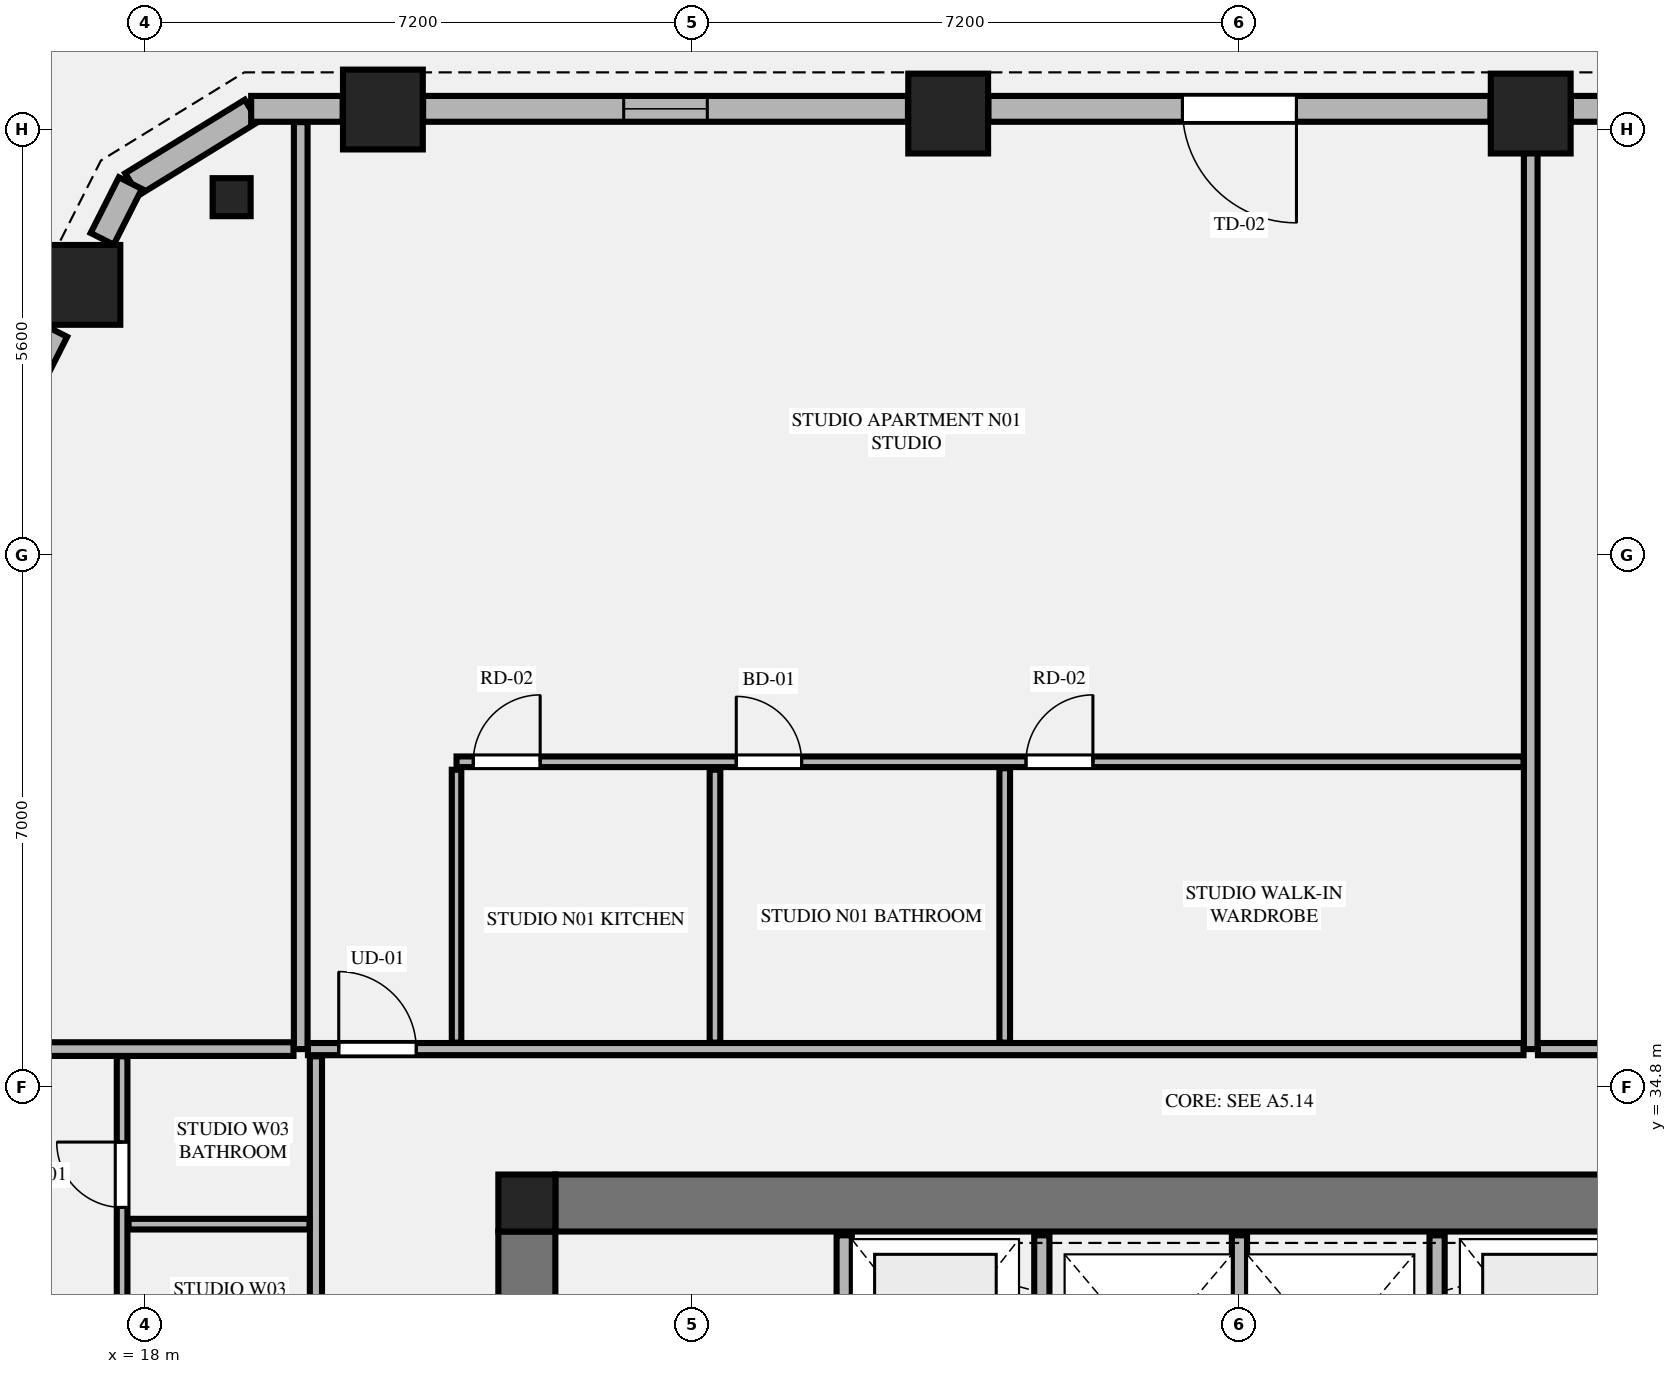
"""IFC4 building model, lengths in metres.
Left out: names, types, materials, properties, quantities, classifications, styles, units other than length and angle.
Written with IfcOpenShell. Run it as: python <this file> out.ifc"""

import sys

from ifc_helpers import new_model, si_unit, direction, frame, frame_2d, origin, origin_2d, place, context, subcontext, project, spatial, rectangle, extrude, element, fill, save


model = new_model("IFC4")
c1 = context("Model", 3, precision=1e-05, world=origin(), true_north=direction((0.0, 1.0)))
c2 = subcontext(c1, "Body", "Model", "MODEL_VIEW")
j1 = project(units=[si_unit("LENGTHUNIT", "METRE"), si_unit("PLANEANGLEUNIT", "RADIAN")], contexts=[c1])
p1 = place(None, origin())
s1 = spatial("IfcSite", under=j1, at=p1, CompositionType="ELEMENT")
p2 = place(p1, origin())
s2 = spatial("IfcBuilding", under=s1, at=p2, CompositionType="ELEMENT")
p3 = place(p2, frame((0.0, 0.0, 98.4)))
s3 = spatial("IfcBuildingStorey", under=s2, at=p3, CompositionType="ELEMENT", Elevation=98.4)
p4 = place(p3, frame((23.025, 33.275, 0.0), z_axis=(0.0, 0.0, 1.0), x_axis=(1.0, 0.0, 0.0)))
e1 = element("IfcColumn", 1, at=p4, inside=s3, PredefinedType="COLUMN", context=c2, shape_type="SweptSolid", body=[
    extrude(rectangle(XDim=0.75, YDim=0.75, at=origin_2d()), origin(), (0.0, 0.0, 1.0), 3.55),
])
p5 = place(p3, frame((23.4, 33.275, 0.0), z_axis=(0.0, 0.0, 1.0), x_axis=(1.0, 0.0, 0.0)))
e2 = element("IfcWall", 2, at=p5, inside=s3, PredefinedType="SHEAR", context=c2, shape_type="SweptSolid", body=[
    extrude(rectangle(XDim=18.0, YDim=0.75, at=frame_2d((9.0, 0.0))), origin(), (0.0, 0.0, 1.0), 3.34),
])
p6 = place(p3, frame((23.025, 18.9, 0.0), z_axis=(0.0, 0.0, 1.0), x_axis=(0.0, 1.0, 0.0)))
e3 = element("IfcWall", 3, at=p6, inside=s3, PredefinedType="SHEAR", context=c2, shape_type="SweptSolid", body=[
    extrude(rectangle(XDim=14.0, YDim=0.75, at=frame_2d((7.0, 0.0))), origin(), (0.0, 0.0, 1.0), 3.34),
])
p7 = place(p6, frame((2.94, 0.0, 0.0)))
e4 = element("IfcOpeningElement", 4, at=p7, cuts=e3, PredefinedType="OPENING", context=c2, shape_type="SweptSolid", body=[
    extrude(rectangle(XDim=1.22, YDim=2.25, at=frame_2d((0.61, 1.125))), frame((0.0, 0.385, 0.0), z_axis=(0.0, -1.0, 0.0), x_axis=(1.0, 0.0, 0.0)), (0.0, 0.0, 1.0), 0.77),
])
for number, where, z_axis, x_axis in (
    (5, (36.232, 47.608, 0.0), (0.0, 0.0, 1.0), (1.0, 0.0, 0.0)),
    (6, (28.568, 47.608, 0.0), (0.0, 0.0, 1.0), (1.0, 0.0, 0.0)),
    (7, (21.131, 47.661, 0.0), (0.0, 0.0, 1.0), (1.0, 0.0, 0.0)),
    (8, (17.151, 45.354, 0.0), (0.0, 0.0, 1.0), (1.0, 0.0, 0.0)),
):
    element("IfcColumn", number, at=place(p3, frame(where, z_axis=z_axis, x_axis=x_axis)), inside=s3, PredefinedType="COLUMN", context=c2, shape_type="SweptSolid", body=[
        extrude(rectangle(XDim=1.05, YDim=1.05, at=origin_2d()), origin(), (0.0, 0.0, 1.0), 3.55),
    ])
p8 = place(p3, frame((19.141, 46.508, 0.0), z_axis=(0.0, 0.0, 1.0), x_axis=(-0.865160173452, -0.501495637342, 0.0)))
e9 = element("IfcColumn", 9, at=p8, inside=s3, PredefinedType="PILASTER", context=c2, shape_type="SweptSolid", body=[
    extrude(rectangle(XDim=0.5, YDim=0.35, at=origin_2d()), origin(), (0.0, 0.0, 1.0), 3.55),
])
for number, where, z_axis, x_axis in (
    (10, (27.2, 30.0, 0.0), (0.0, 0.0, 1.0), (0.0, 1.0, 0.0)),
    (11, (29.8, 30.0, 0.0), (0.0, 0.0, 1.0), (0.0, 1.0, 0.0)),
    (12, (32.4, 30.0, 0.0), (0.0, 0.0, 1.0), (0.0, 1.0, 0.0)),
    (13, (35.0, 30.0, 0.0), (0.0, 0.0, 1.0), (0.0, 1.0, 0.0)),
):
    element("IfcWall", number, at=place(p3, frame(where, z_axis=z_axis, x_axis=x_axis)), inside=s3, PredefinedType="PLUMBINGWALL", context=c2, shape_type="SweptSolid", body=[
        extrude(rectangle(XDim=2.85, YDim=0.2, at=frame_2d((1.425, 0.0))), origin(), (0.0, 0.0, 1.0), 3.34),
    ])
p9 = place(p3, frame((19.403, 47.645, 0.0), z_axis=(0.0, 0.0, 1.0), x_axis=(-0.851798915137, -0.523868884523, 0.0)))
e14 = element("IfcWall", 14, at=p9, inside=s3, PredefinedType="STANDARD", context=c2, shape_type="SweptSolid", body=[
    extrude(rectangle(XDim=1.848, YDim=0.34, at=frame_2d((0.924, 0.0))), origin(), (0.0, 0.0, 1.0), 3.34),
])
p10 = place(p3, frame((43.14, 47.67, 0.0), z_axis=(0.0, 0.0, 1.0), x_axis=(-1.0, 0.0, 0.0)))
e15 = element("IfcWall", 15, at=p10, inside=s3, PredefinedType="STANDARD", context=c2, shape_type="SweptSolid", body=[
    extrude(rectangle(XDim=6.379, YDim=0.34, at=frame_2d((3.189, 0.0))), origin(), (0.0, 0.0, 1.0), 2.797),
])
p11 = place(p10, frame((2.639, 0.0, 0.75)))
e16 = element("IfcOpeningElement", 16, at=p11, cuts=e15, PredefinedType="OPENING", context=c2, shape_type="SweptSolid", body=[
    extrude(rectangle(XDim=1.1, YDim=1.897, at=frame_2d((0.55, 0.948))), frame((0.0, 0.18, 0.0), z_axis=(0.0, -1.0, 0.0), x_axis=(1.0, 0.0, 0.0)), (0.0, 0.0, 1.0), 0.36),
])
p12 = place(p3, frame((35.703, 47.67, 0.0), z_axis=(0.0, 0.0, 1.0), x_axis=(-1.0, 0.0, 0.0)))
e17 = element("IfcWall", 17, at=p12, inside=s3, PredefinedType="STANDARD", context=c2, shape_type="SweptSolid", body=[
    extrude(rectangle(XDim=6.606, YDim=0.34, at=frame_2d((3.303, 0.0))), origin(), (0.0, 0.0, 1.0), 2.797),
])
p13 = place(p12, frame((2.553, 0.0, 0.0)))
e18 = element("IfcOpeningElement", 18, at=p13, cuts=e17, PredefinedType="OPENING", context=c2, shape_type="SweptSolid", body=[
    extrude(rectangle(XDim=1.5, YDim=2.3, at=frame_2d((0.75, 1.15))), frame((0.0, 0.18, 0.0), z_axis=(0.0, -1.0, 0.0), x_axis=(1.0, 0.0, 0.0)), (0.0, 0.0, 1.0), 0.36),
])
p14 = place(p3, frame((28.039, 47.67, 0.0), z_axis=(0.0, 0.0, 1.0), x_axis=(-1.0, 0.0, 0.0)))
e19 = element("IfcWall", 19, at=p14, inside=s3, PredefinedType="STANDARD", context=c2, shape_type="SweptSolid", body=[
    extrude(rectangle(XDim=6.379, YDim=0.34, at=frame_2d((3.189, 0.0))), origin(), (0.0, 0.0, 1.0), 2.797),
])
p15 = place(p14, frame((2.64, 0.0, 0.75)))
e20 = element("IfcOpeningElement", 20, at=p15, cuts=e19, PredefinedType="OPENING", context=c2, shape_type="SweptSolid", body=[
    extrude(rectangle(XDim=1.1, YDim=1.897, at=frame_2d((0.55, 0.948))), frame((0.0, 0.18, 0.0), z_axis=(0.0, -1.0, 0.0), x_axis=(1.0, 0.0, 0.0)), (0.0, 0.0, 1.0), 0.36),
])
p16 = place(p3, frame((20.602, 47.67, 0.0), z_axis=(0.0, 0.0, 1.0), x_axis=(-1.0, 0.0, 0.0)))
e21 = element("IfcWall", 21, at=p16, inside=s3, PredefinedType="STANDARD", context=c2, shape_type="SweptSolid", body=[
    extrude(rectangle(XDim=1.204, YDim=0.34, at=frame_2d((0.602, 0.0))), origin(), (0.0, 0.0, 1.0), 3.34),
])
p17 = place(p3, frame((17.809, 46.693, 0.0), z_axis=(0.0, 0.0, 1.0), x_axis=(-0.45160540153, -0.89221777684, 0.0)))
e22 = element("IfcWall", 22, at=p17, inside=s3, PredefinedType="STANDARD", context=c2, shape_type="SweptSolid", body=[
    extrude(rectangle(XDim=0.822, YDim=0.34, at=frame_2d((0.411, 0.0))), origin(), (0.0, 0.0, 1.0), 3.34),
])
p18 = place(p3, frame((16.825, 44.748, 0.0), z_axis=(0.0, 0.0, 1.0), x_axis=(-0.451548465867, -0.892246593142, 0.0)))
e23 = element("IfcWall", 23, at=p18, inside=s3, PredefinedType="STANDARD", context=c2, shape_type="SweptSolid", body=[
    extrude(rectangle(XDim=5.04, YDim=0.34, at=frame_2d((2.52, 0.0))), origin(), (0.0, 0.0, 1.0), 2.797),
])
p19 = place(p18, frame((1.97, 0.0, 0.75)))
e24 = element("IfcOpeningElement", 24, at=p19, cuts=e23, PredefinedType="OPENING", context=c2, shape_type="SweptSolid", body=[
    extrude(rectangle(XDim=1.1, YDim=1.897, at=frame_2d((0.55, 0.948))), frame((0.0, 0.18, 0.0), z_axis=(0.0, -1.0, 0.0), x_axis=(1.0, 0.0, 0.0)), (0.0, 0.0, 1.0), 0.36),
])
p20 = place(p3, frame((20.05, 35.3, 0.0), z_axis=(0.0, 0.0, 1.0), x_axis=(0.0, 1.0, 0.0)))
e25 = element("IfcWall", 25, at=p20, inside=s3, PredefinedType="PARTITIONING", context=c2, shape_type="SweptSolid", body=[
    extrude(rectangle(XDim=12.195, YDim=0.18, at=frame_2d((6.098, 0.0))), origin(), (0.0, 0.0, 1.0), 3.34),
])
p21 = place(p3, frame((36.232, 35.3, 0.0), z_axis=(0.0, 0.0, 1.0), x_axis=(0.0, 1.0, 0.0)))
e26 = element("IfcWall", 26, at=p21, inside=s3, PredefinedType="PARTITIONING", context=c2, shape_type="SweptSolid", body=[
    extrude(rectangle(XDim=12.195, YDim=0.18, at=frame_2d((6.098, 0.0))), origin(), (0.0, 0.0, 1.0), 2.722),
])
p22 = place(p3, frame((20.145, 35.3, 0.0), z_axis=(0.0, 0.0, 1.0), x_axis=(1.0, 0.0, 0.0)))
e27 = element("IfcWall", 27, at=p22, inside=s3, PredefinedType="PARTITIONING", context=c2, shape_type="SweptSolid", body=[
    extrude(rectangle(XDim=15.992, YDim=0.16, at=frame_2d((7.996, 0.0))), origin(), (0.0, 0.0, 1.0), 3.34),
])
p23 = place(p22, frame((0.405, 0.0, 0.0)))
e28 = element("IfcOpeningElement", 28, at=p23, cuts=e27, PredefinedType="OPENING", context=c2, shape_type="SweptSolid", body=[
    extrude(rectangle(XDim=1.02, YDim=2.25, at=frame_2d((0.51, 1.125))), frame((0.0, 0.09, 0.0), z_axis=(0.0, -1.0, 0.0), x_axis=(1.0, 0.0, 0.0)), (0.0, 0.0, 1.0), 0.18),
])
p24 = place(p3, frame((22.1, 35.385, 0.0), z_axis=(0.0, 0.0, 1.0), x_axis=(0.0, 1.0, 0.0)))
e29 = element("IfcWall", 29, at=p24, inside=s3, PredefinedType="PARTITIONING", context=c2, shape_type="SweptSolid", body=[
    extrude(rectangle(XDim=3.59, YDim=0.125, at=frame_2d((1.795, 0.0))), origin(), (0.0, 0.0, 1.0), 2.722),
])
p25 = place(p3, frame((22.1, 39.08, 0.0), z_axis=(0.0, 0.0, 1.0), x_axis=(1.0, 0.0, 0.0)))
e30 = element("IfcWall", 30, at=p25, inside=s3, PredefinedType="PLUMBINGWALL", context=c2, shape_type="SweptSolid", body=[
    extrude(rectangle(XDim=14.037, YDim=0.14, at=frame_2d((7.019, 0.0))), origin(), (0.0, 0.0, 1.0), 3.34),
])
p26 = place(p25, frame((3.68, 0.0, 0.0)))
e31 = element("IfcOpeningElement", 31, at=p26, cuts=e30, PredefinedType="OPENING", context=c2, shape_type="SweptSolid", body=[
    extrude(rectangle(XDim=0.86, YDim=2.1, at=frame_2d((0.43, 1.05))), frame((0.0, 0.08, 0.0), z_axis=(0.0, -1.0, 0.0), x_axis=(1.0, 0.0, 0.0)), (0.0, 0.0, 1.0), 0.16),
])
p27 = place(p25, frame((7.492, 0.0, 0.0)))
e32 = element("IfcOpeningElement", 32, at=p27, cuts=e30, PredefinedType="OPENING", context=c2, shape_type="SweptSolid", body=[
    extrude(rectangle(XDim=0.88, YDim=2.15, at=frame_2d((0.44, 1.075))), frame((0.0, 0.08, 0.0), z_axis=(0.0, -1.0, 0.0), x_axis=(1.0, 0.0, 0.0)), (0.0, 0.0, 1.0), 0.16),
])
p28 = place(p25, frame((0.22, 0.0, 0.0)))
e33 = element("IfcOpeningElement", 33, at=p28, cuts=e30, PredefinedType="OPENING", context=c2, shape_type="SweptSolid", body=[
    extrude(rectangle(XDim=0.88, YDim=2.15, at=frame_2d((0.44, 1.075))), frame((0.0, 0.08, 0.0), z_axis=(0.0, -1.0, 0.0), x_axis=(1.0, 0.0, 0.0)), (0.0, 0.0, 1.0), 0.16),
])
p29 = place(p3, frame((25.5, 35.385, 0.0), z_axis=(0.0, 0.0, 1.0), x_axis=(0.0, 1.0, 0.0)))
e34 = element("IfcWall", 34, at=p29, inside=s3, PredefinedType="PLUMBINGWALL", context=c2, shape_type="SweptSolid", body=[
    extrude(rectangle(XDim=3.59, YDim=0.14, at=frame_2d((1.795, 0.0))), origin(), (0.0, 0.0, 1.0), 3.34),
])
p30 = place(p3, frame((29.312, 35.385, 0.0), z_axis=(0.0, 0.0, 1.0), x_axis=(0.0, 1.0, 0.0)))
e35 = element("IfcWall", 35, at=p30, inside=s3, PredefinedType="PLUMBINGWALL", context=c2, shape_type="SweptSolid", body=[
    extrude(rectangle(XDim=3.61, YDim=0.14, at=frame_2d((1.805, 0.0))), origin(), (0.0, 0.0, 1.0), 3.34),
])
p31 = place(p3, frame((36.327, 35.3, 0.0), z_axis=(0.0, 0.0, 1.0), x_axis=(1.0, 0.0, 0.0)))
e36 = element("IfcWall", 36, at=p31, inside=s3, PredefinedType="PARTITIONING", context=c2, shape_type="SweptSolid", body=[
    extrude(rectangle(XDim=8.328, YDim=0.16, at=frame_2d((4.164, 0.0))), origin(), (0.0, 0.0, 1.0), 3.34),
])
p32 = place(p31, frame((6.073, 0.0, 0.0)))
e37 = element("IfcOpeningElement", 37, at=p32, cuts=e36, PredefinedType="OPENING", context=c2, shape_type="SweptSolid", body=[
    extrude(rectangle(XDim=1.02, YDim=2.25, at=frame_2d((0.51, 1.125))), frame((0.0, 0.09, 0.0), z_axis=(0.0, -1.0, 0.0), x_axis=(1.0, 0.0, 0.0)), (0.0, 0.0, 1.0), 0.18),
])
p33 = place(p3, frame((12.286, 35.3, 0.0), z_axis=(0.0, 0.0, 1.0), x_axis=(1.0, 0.0, 0.0)))
e38 = element("IfcWall", 38, at=p33, inside=s3, PredefinedType="PARTITIONING", context=c2, shape_type="SweptSolid", body=[
    extrude(rectangle(XDim=7.669, YDim=0.18, at=frame_2d((3.834, 0.0))), origin(), (0.0, 0.0, 1.0), 3.34),
])
p34 = place(p3, frame((20.25, 29.003, 0.0), z_axis=(0.0, 0.0, 1.0), x_axis=(0.0, 1.0, 0.0)))
e39 = element("IfcWall", 39, at=p34, inside=s3, PredefinedType="PARTITIONING", context=c2, shape_type="SweptSolid", body=[
    extrude(rectangle(XDim=6.202, YDim=0.16, at=frame_2d((3.101, 0.0))), origin(), (0.0, 0.0, 1.0), 3.34),
])
p35 = place(p34, frame((0.4, 0.0, 0.0)))
e40 = element("IfcOpeningElement", 40, at=p35, cuts=e39, PredefinedType="OPENING", context=c2, shape_type="SweptSolid", body=[
    extrude(rectangle(XDim=1.02, YDim=2.25, at=frame_2d((0.51, 1.125))), frame((0.0, 0.09, 0.0), z_axis=(0.0, -1.0, 0.0), x_axis=(1.0, 0.0, 0.0)), (0.0, 0.0, 1.0), 0.18),
])
p36 = place(p3, frame((17.7, 30.958, 0.0), z_axis=(0.0, 0.0, 1.0), x_axis=(0.0, 1.0, 0.0)))
e41 = element("IfcWall", 41, at=p36, inside=s3, PredefinedType="PLUMBINGWALL", context=c2, shape_type="SweptSolid", body=[
    extrude(rectangle(XDim=4.247, YDim=0.14, at=frame_2d((2.124, 0.0))), origin(), (0.0, 0.0, 1.0), 3.34),
])
p37 = place(p36, frame((2.259, 0.0, 0.0)))
e42 = element("IfcOpeningElement", 42, at=p37, cuts=e41, PredefinedType="OPENING", context=c2, shape_type="SweptSolid", body=[
    extrude(rectangle(XDim=0.86, YDim=2.1, at=frame_2d((0.43, 1.05))), frame((0.0, 0.08, 0.0), z_axis=(0.0, -1.0, 0.0), x_axis=(1.0, 0.0, 0.0)), (0.0, 0.0, 1.0), 0.16),
])
p38 = place(p36, frame((0.2, 0.0, 0.0)))
e43 = element("IfcOpeningElement", 43, at=p38, cuts=e41, PredefinedType="OPENING", context=c2, shape_type="SweptSolid", body=[
    extrude(rectangle(XDim=0.88, YDim=2.15, at=frame_2d((0.44, 1.075))), frame((0.0, 0.08, 0.0), z_axis=(0.0, -1.0, 0.0), x_axis=(1.0, 0.0, 0.0)), (0.0, 0.0, 1.0), 0.16),
])
p39 = place(p3, frame((17.785, 32.997, 0.0), z_axis=(0.0, 0.0, 1.0), x_axis=(1.0, 0.0, 0.0)))
e44 = element("IfcWall", 44, at=p39, inside=s3, PredefinedType="PLUMBINGWALL", context=c2, shape_type="SweptSolid", body=[
    extrude(rectangle(XDim=2.38, YDim=0.14, at=frame_2d((1.19, 0.0))), origin(), (0.0, 0.0, 1.0), 3.34),
])
p40 = place(p13, origin())
e45 = element("IfcDoor", 45, at=p40, inside=s3, OperationType="SINGLE_SWING_LEFT", PredefinedType="DOOR", context=c2, shape_type="SweptSolid", body=[
    extrude(rectangle(XDim=1.5, YDim=2.3, at=frame_2d((0.75, 1.15))), frame((0.0, 0.025, 0.0), z_axis=(0.0, -1.0, 0.0), x_axis=(1.0, 0.0, 0.0)), (0.0, 0.0, 1.0), 0.05),
])
fill(e18, e45)
p41 = place(p15, origin())
e46 = element("IfcWindow", 46, at=p41, inside=s3, PartitioningType="SINGLE_PANEL", PredefinedType="WINDOW", context=c2, shape_type="SweptSolid", body=[
    extrude(rectangle(XDim=1.1, YDim=1.897, at=frame_2d((0.55, 0.948))), frame((0.0, 0.03, 0.0), z_axis=(0.0, -1.0, 0.0), x_axis=(1.0, 0.0, 0.0)), (0.0, 0.0, 1.0), 0.06),
])
fill(e20, e46)
p42 = place(p26, origin())
e47 = element("IfcDoor", 47, at=p42, inside=s3, OperationType="SINGLE_SWING_LEFT", PredefinedType="DOOR", context=c2, shape_type="SweptSolid", body=[
    extrude(rectangle(XDim=0.86, YDim=2.1, at=frame_2d((0.43, 1.05))), frame((0.0, 0.025, 0.0), z_axis=(0.0, -1.0, 0.0), x_axis=(1.0, 0.0, 0.0)), (0.0, 0.0, 1.0), 0.05),
])
fill(e31, e47)
p43 = place(p27, origin())
e48 = element("IfcDoor", 48, at=p43, inside=s3, OperationType="SINGLE_SWING_RIGHT", PredefinedType="DOOR", context=c2, shape_type="SweptSolid", body=[
    extrude(rectangle(XDim=0.88, YDim=2.15, at=frame_2d((0.44, 1.075))), frame((0.0, 0.025, 0.0), z_axis=(0.0, -1.0, 0.0), x_axis=(1.0, 0.0, 0.0)), (0.0, 0.0, 1.0), 0.05),
])
fill(e32, e48)
p44 = place(p23, origin())
e49 = element("IfcDoor", 49, at=p44, inside=s3, OperationType="SINGLE_SWING_LEFT", PredefinedType="DOOR", context=c2, shape_type="SweptSolid", body=[
    extrude(rectangle(XDim=1.02, YDim=2.25, at=frame_2d((0.51, 1.125))), frame((0.0, 0.025, 0.0), z_axis=(0.0, -1.0, 0.0), x_axis=(1.0, 0.0, 0.0)), (0.0, 0.0, 1.0), 0.05),
])
fill(e28, e49)
p45 = place(p28, origin())
e50 = element("IfcDoor", 50, at=p45, inside=s3, OperationType="SINGLE_SWING_RIGHT", PredefinedType="DOOR", context=c2, shape_type="SweptSolid", body=[
    extrude(rectangle(XDim=0.88, YDim=2.15, at=frame_2d((0.44, 1.075))), frame((0.0, 0.025, 0.0), z_axis=(0.0, -1.0, 0.0), x_axis=(1.0, 0.0, 0.0)), (0.0, 0.0, 1.0), 0.05),
])
fill(e33, e50)
p46 = place(p37, origin())
e51 = element("IfcDoor", 51, at=p46, inside=s3, OperationType="SINGLE_SWING_RIGHT", PredefinedType="DOOR", context=c2, shape_type="SweptSolid", body=[
    extrude(rectangle(XDim=0.86, YDim=2.1, at=frame_2d((0.43, 1.05))), frame((0.0, 0.025, 0.0), z_axis=(0.0, -1.0, 0.0), x_axis=(1.0, 0.0, 0.0)), (0.0, 0.0, 1.0), 0.05),
])
fill(e42, e51)
save(model, sys.argv[1])
